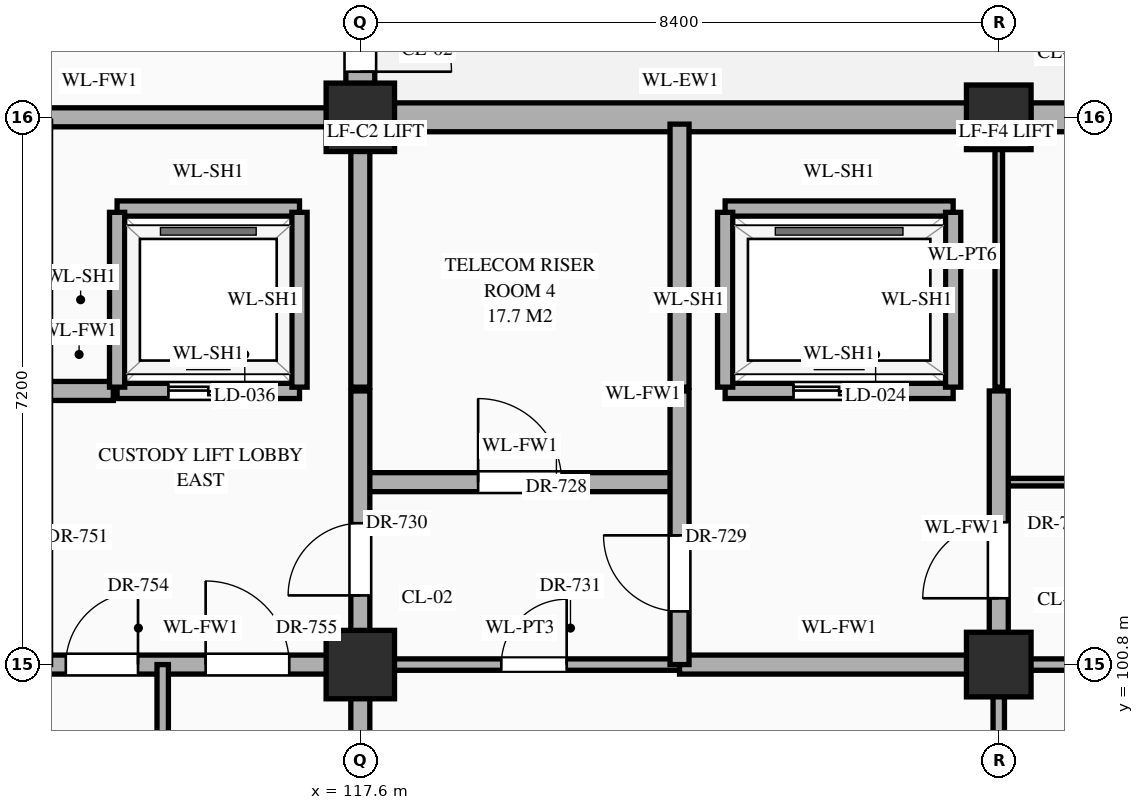
"""IFC4 building model, lengths in metres.
Left out: names, types, materials, properties, quantities, classifications, styles, units other than length and angle.
Written with IfcOpenShell. Run it as: python <this file> out.ifc"""

import sys

from ifc_helpers import new_model, si_unit, direction, frame, frame_2d, origin, origin_2d, place, context, subcontext, project, spatial, rectangle, extrude, element, fill, save


model = new_model("IFC4")
c1 = context("Model", 3, precision=1e-05, world=origin(), true_north=direction((0.0, 1.0)))
c2 = subcontext(c1, "Body", "Model", "MODEL_VIEW")
j1 = project(units=[si_unit("LENGTHUNIT", "METRE"), si_unit("PLANEANGLEUNIT", "RADIAN")], contexts=[c1])
p1 = place(None, origin())
s1 = spatial("IfcSite", under=j1, at=p1, CompositionType="ELEMENT")
p2 = place(p1, origin())
s2 = spatial("IfcBuilding", under=s1, at=p2, CompositionType="ELEMENT")
p3 = place(p2, origin())
s3 = spatial("IfcBuildingStorey", under=s2, at=p3, CompositionType="ELEMENT", Elevation=0.0)
for number, where, z_axis, x_axis in (
    (1, (117.6, 100.8, 0.0), (0.0, 0.0, 1.0), (1.0, 0.0, 0.0)),
    (2, (117.6, 108.0, 0.0), (0.0, 0.0, 1.0), (1.0, 0.0, 0.0)),
):
    element("IfcColumn", number, at=place(p3, frame(where, z_axis=z_axis, x_axis=x_axis)), inside=s3, PredefinedType="COLUMN", context=c2, shape_type="SweptSolid", body=[
        extrude(rectangle(XDim=0.9, YDim=0.9, at=origin_2d()), origin(), (0.0, 0.0, 1.0), 5.4),
    ])
for number, where, z_axis, x_axis in (
    (3, (126.0, 100.8, 0.0), (0.0, 0.0, 1.0), (1.0, 0.0, 0.0)),
    (4, (126.0, 108.0, 0.0), (0.0, 0.0, 1.0), (1.0, 0.0, 0.0)),
):
    element("IfcColumn", number, at=place(p3, frame(where, z_axis=z_axis, x_axis=x_axis)), inside=s3, PredefinedType="COLUMN", context=c2, shape_type="SweptSolid", body=[
        extrude(rectangle(XDim=0.85, YDim=0.85, at=origin_2d()), origin(), (0.0, 0.0, 1.0), 5.4),
    ])
p4 = place(p3, frame((117.6, 108.445, 0.0), z_axis=(0.0, 0.0, 1.0), x_axis=(0.0, 1.0, 0.0)))
e5 = element("IfcWall", 5, at=p4, inside=s3, PredefinedType="STANDARD", context=c2, shape_type="SweptSolid", body=[
    extrude(rectangle(XDim=6.335, YDim=0.38, at=frame_2d((3.167, 0.0))), origin(), (0.0, 0.0, 1.0), 4.47),
])
p5 = place(p4, frame((0.155, 0.0, 0.0)))
e6 = element("IfcOpeningElement", 6, at=p5, cuts=e5, PredefinedType="OPENING", context=c2, shape_type="SweptSolid", body=[
    extrude(rectangle(XDim=1.2, YDim=2.2, at=frame_2d((0.6, 1.1))), frame((0.0, 0.202, 0.0), z_axis=(0.0, -1.0, 0.0), x_axis=(1.0, 0.0, 0.0)), (0.0, 0.0, 1.0), 0.404),
])
p6 = place(p3, frame((118.045, 108.0, 0.0), z_axis=(0.0, 0.0, 1.0), x_axis=(1.0, 0.0, 0.0)))
e7 = element("IfcWall", 7, at=p6, inside=s3, PredefinedType="STANDARD", context=c2, shape_type="SweptSolid", body=[
    extrude(rectangle(XDim=7.535, YDim=0.38, at=frame_2d((3.768, 0.0))), origin(), (0.0, 0.0, 1.0), 4.47),
])
p7 = place(p3, frame((126.42, 108.0, 0.0), z_axis=(0.0, 0.0, 1.0), x_axis=(1.0, 0.0, 0.0)))
e8 = element("IfcWall", 8, at=p7, inside=s3, PredefinedType="STANDARD", context=c2, shape_type="SweptSolid", body=[
    extrude(rectangle(XDim=7.56, YDim=0.38, at=frame_2d((3.78, 0.0))), origin(), (0.0, 0.0, 1.0), 4.47),
])
p8 = place(p7, frame((5.255, 0.0, 0.85)))
e9 = element("IfcOpeningElement", 9, at=p8, cuts=e8, PredefinedType="OPENING", context=c2, shape_type="SweptSolid", body=[
    extrude(rectangle(XDim=1.05, YDim=1.56, at=frame_2d((0.525, 0.78))), frame((0.0, 0.202, 0.0), z_axis=(0.0, -1.0, 0.0), x_axis=(1.0, 0.0, 0.0)), (0.0, 0.0, 1.0), 0.404),
])
p9 = place(p3, frame((113.4, 100.8, 0.0), z_axis=(0.0, 0.0, 1.0), x_axis=(1.0, 0.0, 0.0)))
e10 = element("IfcWall", 10, at=p9, inside=s3, PredefinedType="STANDARD", context=c2, shape_type="SweptSolid", body=[
    extrude(rectangle(XDim=4.2, YDim=0.25, at=frame_2d((2.1, 0.0))), origin(), (0.0, 0.0, 1.0), 4.27),
])
p10 = place(p9, frame((0.325, 0.0, 0.0)))
e11 = element("IfcOpeningElement", 11, at=p10, cuts=e10, PredefinedType="OPENING", context=c2, shape_type="SweptSolid", body=[
    extrude(rectangle(XDim=0.95, YDim=2.15, at=frame_2d((0.475, 1.075))), frame((0.0, 0.137, 0.0), z_axis=(0.0, -1.0, 0.0), x_axis=(1.0, 0.0, 0.0)), (0.0, 0.0, 1.0), 0.274),
])
p11 = place(p9, frame((2.165, 0.0, 0.0)))
e12 = element("IfcOpeningElement", 12, at=p11, cuts=e10, PredefinedType="OPENING", context=c2, shape_type="SweptSolid", body=[
    extrude(rectangle(XDim=1.1, YDim=2.2, at=frame_2d((0.55, 1.1))), frame((0.0, 0.137, 0.0), z_axis=(0.0, -1.0, 0.0), x_axis=(1.0, 0.0, 0.0)), (0.0, 0.0, 1.0), 0.274),
])
p12 = place(p3, frame((117.6, 100.8, 0.0), z_axis=(0.0, 0.0, 1.0), x_axis=(1.0, 0.0, 0.0)))
e13 = element("IfcWall", 13, at=p12, inside=s3, PredefinedType="STANDARD", context=c2, shape_type="SweptSolid", body=[
    extrude(rectangle(XDim=4.2, YDim=0.15, at=frame_2d((2.1, 0.0))), origin(), (0.0, 0.0, 1.0), 4.27),
])
p13 = place(p12, frame((1.855, 0.0, 0.0)))
e14 = element("IfcOpeningElement", 14, at=p13, cuts=e13, PredefinedType="OPENING", context=c2, shape_type="SweptSolid", body=[
    extrude(rectangle(XDim=0.86, YDim=2.1, at=frame_2d((0.43, 1.05))), frame((0.0, 0.087, 0.0), z_axis=(0.0, -1.0, 0.0), x_axis=(1.0, 0.0, 0.0)), (0.0, 0.0, 1.0), 0.174),
])
p14 = place(p3, frame((121.8, 100.8, 0.0), z_axis=(0.0, 0.0, 1.0), x_axis=(1.0, 0.0, 0.0)))
e15 = element("IfcWall", 15, at=p14, inside=s3, PredefinedType="STANDARD", context=c2, shape_type="SweptSolid", body=[
    extrude(rectangle(XDim=4.2, YDim=0.25, at=frame_2d((2.1, 0.0))), origin(), (0.0, 0.0, 1.0), 4.27),
])
p15 = place(p3, frame((126.0, 100.8, 0.0), z_axis=(0.0, 0.0, 1.0), x_axis=(1.0, 0.0, 0.0)))
e16 = element("IfcWall", 16, at=p15, inside=s3, PredefinedType="STANDARD", context=c2, shape_type="SweptSolid", body=[
    extrude(rectangle(XDim=8.4, YDim=0.15, at=frame_2d((4.2, 0.0))), origin(), (0.0, 0.0, 1.0), 4.27),
])
p16 = place(p15, frame((3.6, 0.0, 0.0)))
e17 = element("IfcOpeningElement", 17, at=p16, cuts=e16, PredefinedType="OPENING", context=c2, shape_type="SweptSolid", body=[
    extrude(rectangle(XDim=1.2, YDim=2.35, at=frame_2d((0.6, 1.175))), frame((0.0, 0.087, 0.0), z_axis=(0.0, -1.0, 0.0), x_axis=(1.0, 0.0, 0.0)), (0.0, 0.0, 1.0), 0.174),
])
p17 = place(p3, frame((117.6, 103.2, 0.0), z_axis=(0.0, 0.0, 1.0), x_axis=(1.0, 0.0, 0.0)))
e18 = element("IfcWall", 18, at=p17, inside=s3, PredefinedType="STANDARD", context=c2, shape_type="SweptSolid", body=[
    extrude(rectangle(XDim=4.2, YDim=0.25, at=frame_2d((2.1, 0.0))), origin(), (0.0, 0.0, 1.0), 5.12),
])
p18 = place(p17, frame((1.55, 0.0, 0.0)))
e19 = element("IfcOpeningElement", 19, at=p18, cuts=e18, PredefinedType="OPENING", context=c2, shape_type="SweptSolid", body=[
    extrude(rectangle(XDim=1.1, YDim=2.2, at=frame_2d((0.55, 1.1))), frame((0.0, 0.137, 0.0), z_axis=(0.0, -1.0, 0.0), x_axis=(1.0, 0.0, 0.0)), (0.0, 0.0, 1.0), 0.274),
])
p19 = place(p3, frame((126.0, 103.2, 0.0), z_axis=(0.0, 0.0, 1.0), x_axis=(1.0, 0.0, 0.0)))
e20 = element("IfcWall", 20, at=p19, inside=s3, PredefinedType="STANDARD", context=c2, shape_type="SweptSolid", body=[
    extrude(rectangle(XDim=41.96, YDim=0.1, at=frame_2d((20.98, 0.0))), origin(), (0.0, 0.0, 1.0), 5.12),
])
p20 = place(p19, frame((3.7, 0.0, 0.0)))
e21 = element("IfcOpeningElement", 21, at=p20, cuts=e20, PredefinedType="OPENING", context=c2, shape_type="SweptSolid", body=[
    extrude(rectangle(XDim=1.0, YDim=2.25, at=frame_2d((0.5, 1.125))), frame((0.0, 0.062, 0.0), z_axis=(0.0, -1.0, 0.0), x_axis=(1.0, 0.0, 0.0)), (0.0, 0.0, 1.0), 0.124),
])
p21 = place(p19, frame((12.08, 0.0, 0.0)))
e22 = element("IfcOpeningElement", 22, at=p21, cuts=e20, PredefinedType="OPENING", context=c2, shape_type="SweptSolid", body=[
    extrude(rectangle(XDim=1.04, YDim=2.2, at=frame_2d((0.52, 1.1))), frame((0.0, 0.062, 0.0), z_axis=(0.0, -1.0, 0.0), x_axis=(1.0, 0.0, 0.0)), (0.0, 0.0, 1.0), 0.124),
])
p22 = place(p19, frame((20.46, 0.0, 0.0)))
e23 = element("IfcOpeningElement", 23, at=p22, cuts=e20, PredefinedType="OPENING", context=c2, shape_type="SweptSolid", body=[
    extrude(rectangle(XDim=1.08, YDim=2.25, at=frame_2d((0.54, 1.125))), frame((0.0, 0.062, 0.0), z_axis=(0.0, -1.0, 0.0), x_axis=(1.0, 0.0, 0.0)), (0.0, 0.0, 1.0), 0.124),
])
p23 = place(p19, frame((28.84, 0.0, 0.0)))
e24 = element("IfcOpeningElement", 24, at=p23, cuts=e20, PredefinedType="OPENING", context=c2, shape_type="SweptSolid", body=[
    extrude(rectangle(XDim=1.12, YDim=2.25, at=frame_2d((0.56, 1.125))), frame((0.0, 0.062, 0.0), z_axis=(0.0, -1.0, 0.0), x_axis=(1.0, 0.0, 0.0)), (0.0, 0.0, 1.0), 0.124),
])
p24 = place(p19, frame((37.2, 0.0, 0.0)))
e25 = element("IfcOpeningElement", 25, at=p24, cuts=e20, PredefinedType="OPENING", context=c2, shape_type="SweptSolid", body=[
    extrude(rectangle(XDim=1.16, YDim=2.3, at=frame_2d((0.58, 1.15))), frame((0.0, 0.062, 0.0), z_axis=(0.0, -1.0, 0.0), x_axis=(1.0, 0.0, 0.0)), (0.0, 0.0, 1.0), 0.124),
])
p25 = place(p3, frame((113.45, 104.4, 0.0), z_axis=(0.0, 0.0, 1.0), x_axis=(1.0, 0.0, 0.0)))
e26 = element("IfcWall", 26, at=p25, inside=s3, PredefinedType="STANDARD", context=c2, shape_type="SweptSolid", body=[
    extrude(rectangle(XDim=0.9, YDim=0.25, at=frame_2d((0.45, 0.0))), origin(), (0.0, 0.0, 1.0), 5.12),
])
p26 = place(p3, frame((114.4, 104.4, 0.0), z_axis=(0.0, 0.0, 1.0), x_axis=(1.0, 0.0, 0.0)))
e27 = element("IfcWall", 27, at=p26, inside=s3, PredefinedType="STANDARD", context=c2, shape_type="SweptSolid", body=[
    extrude(rectangle(XDim=2.4, YDim=0.2, at=frame_2d((1.2, 0.0))), origin(), (0.0, 0.0, 1.0), 5.12),
])
p27 = place(p26, frame((0.675, 0.0, 0.0)))
e28 = element("IfcOpeningElement", 28, at=p27, cuts=e27, PredefinedType="OPENING", context=c2, shape_type="SweptSolid", body=[
    extrude(rectangle(XDim=1.05, YDim=2.15, at=frame_2d((0.525, 1.075))), frame((0.0, 0.112, 0.0), z_axis=(0.0, -1.0, 0.0), x_axis=(1.0, 0.0, 0.0)), (0.0, 0.0, 1.0), 0.224),
])
p28 = place(p3, frame((122.4, 104.4, 0.0), z_axis=(0.0, 0.0, 1.0), x_axis=(1.0, 0.0, 0.0)))
e29 = element("IfcWall", 29, at=p28, inside=s3, PredefinedType="STANDARD", context=c2, shape_type="SweptSolid", body=[
    extrude(rectangle(XDim=3.0, YDim=0.2, at=frame_2d((1.5, 0.0))), origin(), (0.0, 0.0, 1.0), 5.12),
])
p29 = place(p28, frame((0.9, 0.0, 0.0)))
e30 = element("IfcOpeningElement", 30, at=p29, cuts=e29, PredefinedType="OPENING", context=c2, shape_type="SweptSolid", body=[
    extrude(rectangle(XDim=1.2, YDim=2.15, at=frame_2d((0.6, 1.075))), frame((0.0, 0.112, 0.0), z_axis=(0.0, -1.0, 0.0), x_axis=(1.0, 0.0, 0.0)), (0.0, 0.0, 1.0), 0.224),
])
p30 = place(p3, frame((114.4, 106.8, 0.0), z_axis=(0.0, 0.0, 1.0), x_axis=(1.0, 0.0, 0.0)))
e31 = element("IfcWall", 31, at=p30, inside=s3, PredefinedType="STANDARD", context=c2, shape_type="SweptSolid", body=[
    extrude(rectangle(XDim=2.4, YDim=0.2, at=frame_2d((1.2, 0.0))), origin(), (0.0, 0.0, 1.0), 5.12),
])
p31 = place(p3, frame((122.4, 106.8, 0.0), z_axis=(0.0, 0.0, 1.0), x_axis=(1.0, 0.0, 0.0)))
e32 = element("IfcWall", 32, at=p31, inside=s3, PredefinedType="STANDARD", context=c2, shape_type="SweptSolid", body=[
    extrude(rectangle(XDim=3.0, YDim=0.2, at=frame_2d((1.5, 0.0))), origin(), (0.0, 0.0, 1.0), 5.12),
])
p32 = place(p3, frame((113.45, 108.0, 0.0), z_axis=(0.0, 0.0, 1.0), x_axis=(1.0, 0.0, 0.0)))
e33 = element("IfcWall", 33, at=p32, inside=s3, PredefinedType="STANDARD", context=c2, shape_type="SweptSolid", body=[
    extrude(rectangle(XDim=4.06, YDim=0.25, at=frame_2d((2.03, 0.0))), origin(), (0.0, 0.0, 1.0), 4.27),
])
p33 = place(p3, frame((114.4, 104.45, 0.0), z_axis=(0.0, 0.0, 1.0), x_axis=(0.0, 1.0, 0.0)))
e34 = element("IfcWall", 34, at=p33, inside=s3, PredefinedType="STANDARD", context=c2, shape_type="SweptSolid", body=[
    extrude(rectangle(XDim=2.3, YDim=0.2, at=frame_2d((1.15, 0.0))), origin(), (0.0, 0.0, 1.0), 5.12),
])
p34 = place(p3, frame((115.0, 96.0, 0.0), z_axis=(0.0, 0.0, 1.0), x_axis=(0.0, 1.0, 0.0)))
e35 = element("IfcWall", 35, at=p34, inside=s3, PredefinedType="STANDARD", context=c2, shape_type="SweptSolid", body=[
    extrude(rectangle(XDim=4.8, YDim=0.15, at=frame_2d((2.4, 0.0))), origin(), (0.0, 0.0, 1.0), 5.12),
])
p35 = place(p34, frame((1.92, 0.0, 0.0)))
e36 = element("IfcOpeningElement", 36, at=p35, cuts=e35, PredefinedType="OPENING", context=c2, shape_type="SweptSolid", body=[
    extrude(rectangle(XDim=0.96, YDim=2.2, at=frame_2d((0.48, 1.1))), frame((0.0, 0.087, 0.0), z_axis=(0.0, -1.0, 0.0), x_axis=(1.0, 0.0, 0.0)), (0.0, 0.0, 1.0), 0.174),
])
p36 = place(p3, frame((116.8, 104.45, 0.0), z_axis=(0.0, 0.0, 1.0), x_axis=(0.0, 1.0, 0.0)))
e37 = element("IfcWall", 37, at=p36, inside=s3, PredefinedType="STANDARD", context=c2, shape_type="SweptSolid", body=[
    extrude(rectangle(XDim=2.3, YDim=0.2, at=frame_2d((1.15, 0.0))), origin(), (0.0, 0.0, 1.0), 5.12),
])
p37 = place(p3, frame((117.6, 91.2, 0.0), z_axis=(0.0, 0.0, 1.0), x_axis=(0.0, 1.0, 0.0)))
e38 = element("IfcWall", 38, at=p37, inside=s3, PredefinedType="STANDARD", context=c2, shape_type="SweptSolid", body=[
    extrude(rectangle(XDim=13.2, YDim=0.25, at=frame_2d((6.6, 0.0))), origin(), (0.0, 0.0, 1.0), 4.37),
])
p38 = place(p37, frame((0.515, 0.0, 0.0)))
e39 = element("IfcOpeningElement", 39, at=p38, cuts=e38, PredefinedType="OPENING", context=c2, shape_type="SweptSolid", body=[
    extrude(rectangle(XDim=1.0, YDim=2.2, at=frame_2d((0.5, 1.1))), frame((0.0, 0.137, 0.0), z_axis=(0.0, -1.0, 0.0), x_axis=(1.0, 0.0, 0.0)), (0.0, 0.0, 1.0), 0.274),
])
p39 = place(p37, frame((10.51, 0.0, 0.0)))
e40 = element("IfcOpeningElement", 40, at=p39, cuts=e38, PredefinedType="OPENING", context=c2, shape_type="SweptSolid", body=[
    extrude(rectangle(XDim=0.95, YDim=2.15, at=frame_2d((0.475, 1.075))), frame((0.0, 0.137, 0.0), z_axis=(0.0, -1.0, 0.0), x_axis=(1.0, 0.0, 0.0)), (0.0, 0.0, 1.0), 0.274),
])
p40 = place(p37, frame((3.285, 0.0, 0.0)))
e41 = element("IfcOpeningElement", 41, at=p40, cuts=e38, PredefinedType="OPENING", context=c2, shape_type="SweptSolid", body=[
    extrude(rectangle(XDim=1.0, YDim=2.2, at=frame_2d((0.5, 1.1))), frame((0.0, 0.137, 0.0), z_axis=(0.0, -1.0, 0.0), x_axis=(1.0, 0.0, 0.0)), (0.0, 0.0, 1.0), 0.274),
])
p41 = place(p3, frame((117.6, 104.45, 0.0), z_axis=(0.0, 0.0, 1.0), x_axis=(0.0, 1.0, 0.0)))
e42 = element("IfcWall", 42, at=p41, inside=s3, PredefinedType="STANDARD", context=c2, shape_type="SweptSolid", body=[
    extrude(rectangle(XDim=3.46, YDim=0.25, at=frame_2d((1.73, 0.0))), origin(), (0.0, 0.0, 1.0), 4.37),
])
p42 = place(p3, frame((121.8, 100.8, 0.0), z_axis=(0.0, 0.0, 1.0), x_axis=(0.0, 1.0, 0.0)))
e43 = element("IfcWall", 43, at=p42, inside=s3, PredefinedType="STANDARD", context=c2, shape_type="SweptSolid", body=[
    extrude(rectangle(XDim=3.6, YDim=0.25, at=frame_2d((1.8, 0.0))), origin(), (0.0, 0.0, 1.0), 4.72),
])
p43 = place(p42, frame((0.7, 0.0, 0.0)))
e44 = element("IfcOpeningElement", 44, at=p43, cuts=e43, PredefinedType="OPENING", context=c2, shape_type="SweptSolid", body=[
    extrude(rectangle(XDim=1.0, YDim=2.2, at=frame_2d((0.5, 1.1))), frame((0.0, 0.137, 0.0), z_axis=(0.0, -1.0, 0.0), x_axis=(1.0, 0.0, 0.0)), (0.0, 0.0, 1.0), 0.274),
])
p44 = place(p3, frame((121.8, 104.45, 0.0), z_axis=(0.0, 0.0, 1.0), x_axis=(0.0, 1.0, 0.0)))
e45 = element("IfcWall", 45, at=p44, inside=s3, PredefinedType="STANDARD", context=c2, shape_type="SweptSolid", body=[
    extrude(rectangle(XDim=3.46, YDim=0.25, at=frame_2d((1.73, 0.0))), origin(), (0.0, 0.0, 1.0), 4.72),
])
for number, where, z_axis, x_axis in (
    (46, (122.4, 104.45, 0.0), (0.0, 0.0, 1.0), (0.0, 1.0, 0.0)),
    (47, (125.4, 104.45, 0.0), (0.0, 0.0, 1.0), (0.0, 1.0, 0.0)),
):
    element("IfcWall", number, at=place(p3, frame(where, z_axis=z_axis, x_axis=x_axis)), inside=s3, PredefinedType="STANDARD", context=c2, shape_type="SweptSolid", body=[
        extrude(rectangle(XDim=2.3, YDim=0.2, at=frame_2d((1.15, 0.0))), origin(), (0.0, 0.0, 1.0), 5.12),
    ])
p45 = place(p3, frame((126.0, 96.0, 0.0), z_axis=(0.0, 0.0, 1.0), x_axis=(0.0, 1.0, 0.0)))
e48 = element("IfcWall", 48, at=p45, inside=s3, PredefinedType="STANDARD", context=c2, shape_type="SweptSolid", body=[
    extrude(rectangle(XDim=4.8, YDim=0.15, at=frame_2d((2.4, 0.0))), origin(), (0.0, 0.0, 1.0), 4.37),
])
p46 = place(p3, frame((126.0, 100.8, 0.0), z_axis=(0.0, 0.0, 1.0), x_axis=(0.0, 1.0, 0.0)))
e49 = element("IfcWall", 49, at=p46, inside=s3, PredefinedType="STANDARD", context=c2, shape_type="SweptSolid", body=[
    extrude(rectangle(XDim=3.6, YDim=0.25, at=frame_2d((1.8, 0.0))), origin(), (0.0, 0.0, 1.0), 4.37),
])
p47 = place(p46, frame((0.873, 0.0, 0.0)))
e50 = element("IfcOpeningElement", 50, at=p47, cuts=e49, PredefinedType="OPENING", context=c2, shape_type="SweptSolid", body=[
    extrude(rectangle(XDim=1.0, YDim=2.2, at=frame_2d((0.5, 1.1))), frame((0.0, 0.137, 0.0), z_axis=(0.0, -1.0, 0.0), x_axis=(1.0, 0.0, 0.0)), (0.0, 0.0, 1.0), 0.274),
])
p48 = place(p3, frame((126.0, 104.45, 0.0), z_axis=(0.0, 0.0, 1.0), x_axis=(0.0, 1.0, 0.0)))
e51 = element("IfcWall", 51, at=p48, inside=s3, PredefinedType="STANDARD", context=c2, shape_type="SweptSolid", body=[
    extrude(rectangle(XDim=3.46, YDim=0.1, at=frame_2d((1.73, 0.0))), origin(), (0.0, 0.0, 1.0), 4.37),
])
p49 = place(p5, frame((1.2, 0.0, 0.0), z_axis=(0.0, 0.0, 1.0), x_axis=(-1.0, 0.0, 0.0)))
e52 = element("IfcDoor", 52, at=p49, inside=s3, OperationType="SINGLE_SWING_RIGHT", PredefinedType="DOOR", context=c2, shape_type="SweptSolid", body=[
    extrude(rectangle(XDim=1.2, YDim=2.2, at=frame_2d((0.6, 1.1))), frame((0.0, 0.025, 0.0), z_axis=(0.0, -1.0, 0.0), x_axis=(1.0, 0.0, 0.0)), (0.0, 0.0, 1.0), 0.05),
])
fill(e6, e52)
p50 = place(p29, origin())
e53 = element("IfcDoor", 53, at=p50, inside=s3, OperationType="DOUBLE_DOOR_SLIDING", PredefinedType="DOOR", context=c2, shape_type="SweptSolid", body=[
    extrude(rectangle(XDim=1.2, YDim=2.15, at=frame_2d((0.6, 1.075))), frame((0.0, 0.025, 0.0), z_axis=(0.0, -1.0, 0.0), x_axis=(1.0, 0.0, 0.0)), (0.0, 0.0, 1.0), 0.05),
])
fill(e30, e53)
p51 = place(p27, origin())
e54 = element("IfcDoor", 54, at=p51, inside=s3, OperationType="DOUBLE_DOOR_SLIDING", PredefinedType="DOOR", context=c2, shape_type="SweptSolid", body=[
    extrude(rectangle(XDim=1.05, YDim=2.15, at=frame_2d((0.525, 1.075))), frame((0.0, 0.025, 0.0), z_axis=(0.0, -1.0, 0.0), x_axis=(1.0, 0.0, 0.0)), (0.0, 0.0, 1.0), 0.05),
])
fill(e28, e54)
p52 = place(p18, origin())
e55 = element("IfcDoor", 55, at=p52, inside=s3, OperationType="SINGLE_SWING_LEFT", PredefinedType="DOOR", context=c2, shape_type="SweptSolid", body=[
    extrude(rectangle(XDim=1.1, YDim=2.2, at=frame_2d((0.55, 1.1))), frame((0.0, 0.025, 0.0), z_axis=(0.0, -1.0, 0.0), x_axis=(1.0, 0.0, 0.0)), (0.0, 0.0, 1.0), 0.05),
])
fill(e19, e55)
p53 = place(p43, origin())
e56 = element("IfcDoor", 56, at=p53, inside=s3, OperationType="SINGLE_SWING_RIGHT", PredefinedType="DOOR", context=c2, shape_type="SweptSolid", body=[
    extrude(rectangle(XDim=1.0, YDim=2.2, at=frame_2d((0.5, 1.1))), frame((0.0, 0.025, 0.0), z_axis=(0.0, -1.0, 0.0), x_axis=(1.0, 0.0, 0.0)), (0.0, 0.0, 1.0), 0.05),
])
fill(e44, e56)
p54 = place(p39, origin())
e57 = element("IfcDoor", 57, at=p54, inside=s3, OperationType="SINGLE_SWING_LEFT", PredefinedType="DOOR", context=c2, shape_type="SweptSolid", body=[
    extrude(rectangle(XDim=0.95, YDim=2.15, at=frame_2d((0.475, 1.075))), frame((0.0, 0.025, 0.0), z_axis=(0.0, -1.0, 0.0), x_axis=(1.0, 0.0, 0.0)), (0.0, 0.0, 1.0), 0.05),
])
fill(e40, e57)
p55 = place(p13, origin())
e58 = element("IfcDoor", 58, at=p55, inside=s3, OperationType="SINGLE_SWING_RIGHT", PredefinedType="DOOR", context=c2, shape_type="SweptSolid", body=[
    extrude(rectangle(XDim=0.86, YDim=2.1, at=frame_2d((0.43, 1.05))), frame((0.0, 0.025, 0.0), z_axis=(0.0, -1.0, 0.0), x_axis=(1.0, 0.0, 0.0)), (0.0, 0.0, 1.0), 0.05),
])
fill(e14, e58)
p56 = place(p47, origin())
e59 = element("IfcDoor", 59, at=p56, inside=s3, OperationType="SINGLE_SWING_LEFT", PredefinedType="DOOR", context=c2, shape_type="SweptSolid", body=[
    extrude(rectangle(XDim=1.0, YDim=2.2, at=frame_2d((0.5, 1.1))), frame((0.0, 0.025, 0.0), z_axis=(0.0, -1.0, 0.0), x_axis=(1.0, 0.0, 0.0)), (0.0, 0.0, 1.0), 0.05),
])
fill(e50, e59)
p57 = place(p10, origin())
e60 = element("IfcDoor", 60, at=p57, inside=s3, OperationType="SINGLE_SWING_RIGHT", PredefinedType="DOOR", context=c2, shape_type="SweptSolid", body=[
    extrude(rectangle(XDim=0.95, YDim=2.15, at=frame_2d((0.475, 1.075))), frame((0.0, 0.025, 0.0), z_axis=(0.0, -1.0, 0.0), x_axis=(1.0, 0.0, 0.0)), (0.0, 0.0, 1.0), 0.05),
])
fill(e11, e60)
p58 = place(p11, origin())
e61 = element("IfcDoor", 61, at=p58, inside=s3, OperationType="SINGLE_SWING_LEFT", PredefinedType="DOOR", context=c2, shape_type="SweptSolid", body=[
    extrude(rectangle(XDim=1.1, YDim=2.2, at=frame_2d((0.55, 1.1))), frame((0.0, 0.025, 0.0), z_axis=(0.0, -1.0, 0.0), x_axis=(1.0, 0.0, 0.0)), (0.0, 0.0, 1.0), 0.05),
])
fill(e12, e61)
save(model, sys.argv[1])
